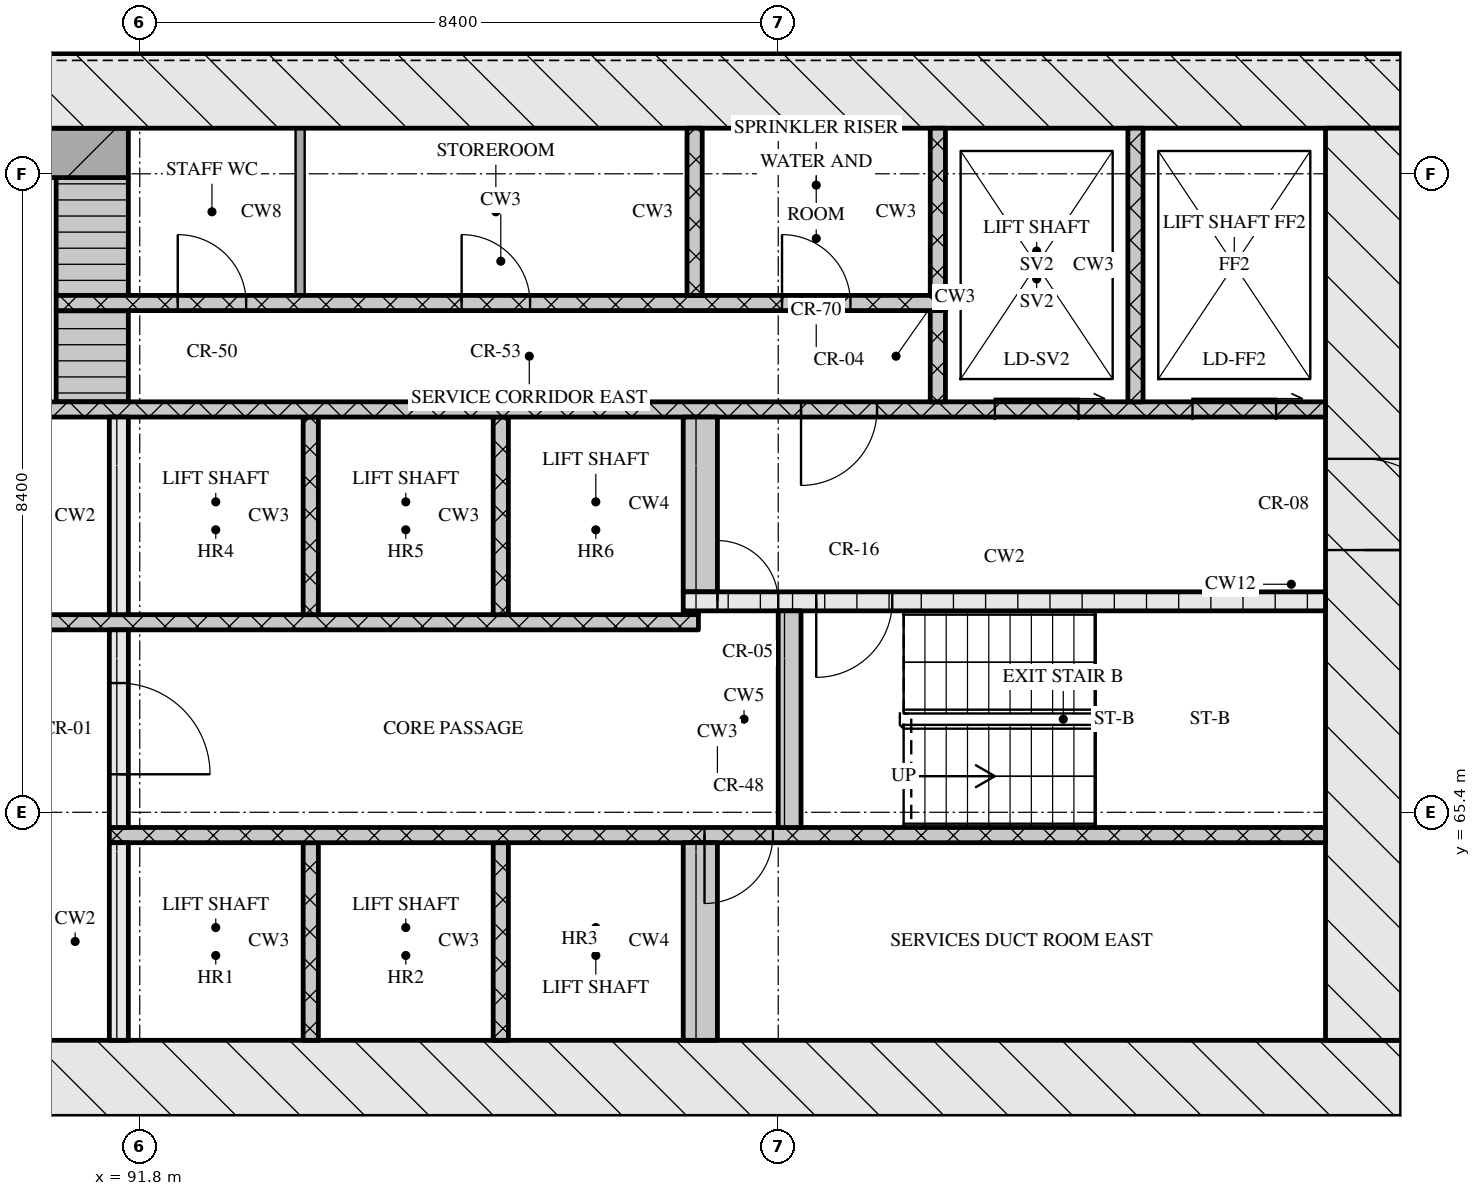
"""IFC4 building model, lengths in metres.
Left out: names, types, materials, properties, quantities, classifications, styles, units other than length and angle.
Written with IfcOpenShell. Run it as: python <this file> out.ifc"""

import sys

from ifc_helpers import new_model, si_unit, direction, frame, frame_2d, origin, place, context, subcontext, project, spatial, rectangle, extrude, element, fill, save


model = new_model("IFC4")
c1 = context("Model", 3, precision=1e-05, world=origin(), true_north=direction((0.0, 1.0)))
c2 = subcontext(c1, "Body", "Model", "MODEL_VIEW")
j1 = project(units=[si_unit("LENGTHUNIT", "METRE"), si_unit("PLANEANGLEUNIT", "RADIAN")], contexts=[c1])
p1 = place(None, origin())
s1 = spatial("IfcSite", under=j1, at=p1, CompositionType="ELEMENT")
p2 = place(p1, origin())
s2 = spatial("IfcBuilding", under=s1, at=p2, CompositionType="ELEMENT")
p3 = place(p2, frame((0.0, 0.0, 113.25)))
s3 = spatial("IfcBuildingStorey", under=s2, at=p3, CompositionType="ELEMENT", Elevation=113.25)
p4 = place(p3, frame((66.8, 61.9, 0.0), z_axis=(0.0, 0.0, 1.0), x_axis=(1.0, 0.0, 0.0)))
e1 = element("IfcWall", 1, at=p4, inside=s3, PredefinedType="SOLIDWALL", context=c2, shape_type="SweptSolid", body=[
    extrude(rectangle(XDim=41.6, YDim=1.0, at=frame_2d((20.8, 0.0))), origin(), (0.0, 0.0, 1.0), 3.32),
])
p5 = place(p4, frame((21.15, 0.0, 0.0)))
e2 = element("IfcOpeningElement", 2, at=p5, cuts=e1, PredefinedType="OPENING", context=c2, shape_type="SweptSolid", body=[
    extrude(rectangle(XDim=1.8, YDim=2.1, at=frame_2d((0.9, 1.05))), frame((0.0, 0.51, 0.0), z_axis=(0.0, -1.0, 0.0), x_axis=(1.0, 0.0, 0.0)), (0.0, 0.0, 1.0), 1.02),
])
p6 = place(p3, frame((66.8, 74.9, 0.0), z_axis=(0.0, 0.0, 1.0), x_axis=(1.0, 0.0, 0.0)))
e3 = element("IfcWall", 3, at=p6, inside=s3, PredefinedType="SOLIDWALL", context=c2, shape_type="SweptSolid", body=[
    extrude(rectangle(XDim=41.6, YDim=1.0, at=frame_2d((20.8, 0.0))), origin(), (0.0, 0.0, 1.0), 3.32),
])
p7 = place(p3, frame((107.9, 62.4, 0.0), z_axis=(0.0, 0.0, 1.0), x_axis=(0.0, 1.0, 0.0)))
e4 = element("IfcWall", 4, at=p7, inside=s3, PredefinedType="SOLIDWALL", context=c2, shape_type="SweptSolid", body=[
    extrude(rectangle(XDim=12.0, YDim=1.0, at=frame_2d((6.0, 0.0))), origin(), (0.0, 0.0, 1.0), 3.32),
])
p8 = place(p7, frame((6.45, 0.0, 0.0)))
e5 = element("IfcOpeningElement", 5, at=p8, cuts=e4, PredefinedType="OPENING", context=c2, shape_type="SweptSolid", body=[
    extrude(rectangle(XDim=1.2, YDim=2.1, at=frame_2d((0.6, 1.05))), frame((0.0, 0.51, 0.0), z_axis=(0.0, -1.0, 0.0), x_axis=(1.0, 0.0, 0.0)), (0.0, 0.0, 1.0), 1.02),
])
p9 = place(p3, frame((91.525, 62.4, 0.0), z_axis=(0.0, 0.0, 1.0), x_axis=(0.0, 1.0, 0.0)))
e6 = element("IfcWall", 6, at=p9, inside=s3, PredefinedType="SOLIDWALL", context=c2, shape_type="SweptSolid", body=[
    extrude(rectangle(XDim=2.6, YDim=0.25, at=frame_2d((1.3, 0.0))), origin(), (0.0, 0.0, 1.0), 3.32),
])
for number, where, z_axis, x_axis in (
    (7, (94.05, 62.4, 0.0), (0.0, 0.0, 1.0), (0.0, 1.0, 0.0)),
    (8, (96.55, 62.4, 0.0), (0.0, 0.0, 1.0), (0.0, 1.0, 0.0)),
):
    element("IfcWall", number, at=place(p3, frame(where, z_axis=z_axis, x_axis=x_axis)), inside=s3, PredefinedType="SOLIDWALL", context=c2, shape_type="SweptSolid", body=[
        extrude(rectangle(XDim=2.6, YDim=0.2, at=frame_2d((1.3, 0.0))), origin(), (0.0, 0.0, 1.0), 3.32),
    ])
p10 = place(p3, frame((99.175, 62.4, 0.0), z_axis=(0.0, 0.0, 1.0), x_axis=(0.0, 1.0, 0.0)))
e9 = element("IfcWall", 9, at=p10, inside=s3, PredefinedType="SOLIDWALL", context=c2, shape_type="SweptSolid", body=[
    extrude(rectangle(XDim=2.6, YDim=0.45, at=frame_2d((1.3, 0.0))), origin(), (0.0, 0.0, 1.0), 3.32),
])
p11 = place(p3, frame((91.4, 65.1, 0.0), z_axis=(0.0, 0.0, 1.0), x_axis=(1.0, 0.0, 0.0)))
e10 = element("IfcWall", 10, at=p11, inside=s3, PredefinedType="SOLIDWALL", context=c2, shape_type="SweptSolid", body=[
    extrude(rectangle(XDim=16.0, YDim=0.2, at=frame_2d((8.0, 0.0))), origin(), (0.0, 0.0, 1.0), 3.32),
])
p12 = place(p11, frame((7.83, 0.0, 0.0)))
e11 = element("IfcOpeningElement", 11, at=p12, cuts=e10, PredefinedType="OPENING", context=c2, shape_type="SweptSolid", body=[
    extrude(rectangle(XDim=0.9, YDim=2.1, at=frame_2d((0.45, 1.05))), frame((0.0, 0.11, 0.0), z_axis=(0.0, -1.0, 0.0), x_axis=(1.0, 0.0, 0.0)), (0.0, 0.0, 1.0), 0.22),
])
p13 = place(p3, frame((91.525, 65.2, 0.0), z_axis=(0.0, 0.0, 1.0), x_axis=(0.0, 1.0, 0.0)))
e12 = element("IfcWall", 12, at=p13, inside=s3, PredefinedType="SOLIDWALL", context=c2, shape_type="SweptSolid", body=[
    extrude(rectangle(XDim=2.6, YDim=0.25, at=frame_2d((1.3, 0.0))), origin(), (0.0, 0.0, 1.0), 3.32),
])
p14 = place(p13, frame((0.7, 0.0, 0.0)))
e13 = element("IfcOpeningElement", 13, at=p14, cuts=e12, PredefinedType="OPENING", context=c2, shape_type="SweptSolid", body=[
    extrude(rectangle(XDim=1.2, YDim=2.1, at=frame_2d((0.6, 1.05))), frame((0.0, 0.135, 0.0), z_axis=(0.0, -1.0, 0.0), x_axis=(1.0, 0.0, 0.0)), (0.0, 0.0, 1.0), 0.27),
])
p15 = place(p3, frame((100.35, 65.2, 0.0), z_axis=(0.0, 0.0, 1.0), x_axis=(0.0, 1.0, 0.0)))
e14 = element("IfcWall", 14, at=p15, inside=s3, PredefinedType="SOLIDWALL", context=c2, shape_type="SweptSolid", body=[
    extrude(rectangle(XDim=2.85, YDim=0.3, at=frame_2d((1.425, 0.0))), origin(), (0.0, 0.0, 1.0), 3.32),
])
p16 = place(p3, frame((76.05, 67.9, 0.0), z_axis=(0.0, 0.0, 1.0), x_axis=(1.0, 0.0, 0.0)))
e15 = element("IfcWall", 15, at=p16, inside=s3, PredefinedType="SOLIDWALL", context=c2, shape_type="SweptSolid", body=[
    extrude(rectangle(XDim=23.1, YDim=0.2, at=frame_2d((11.55, 0.0))), origin(), (0.0, 0.0, 1.0), 3.32),
])
p17 = place(p16, frame((0.6, 0.0, 0.0)))
e16 = element("IfcOpeningElement", 16, at=p17, cuts=e15, PredefinedType="OPENING", context=c2, shape_type="SweptSolid", body=[
    extrude(rectangle(XDim=1.1, YDim=2.1, at=frame_2d((0.55, 1.05))), frame((0.0, 0.11, 0.0), z_axis=(0.0, -1.0, 0.0), x_axis=(1.0, 0.0, 0.0)), (0.0, 0.0, 1.0), 0.22),
])
p18 = place(p16, frame((3.1, 0.0, 0.0)))
e17 = element("IfcOpeningElement", 17, at=p18, cuts=e15, PredefinedType="OPENING", context=c2, shape_type="SweptSolid", body=[
    extrude(rectangle(XDim=1.1, YDim=2.1, at=frame_2d((0.55, 1.05))), frame((0.0, 0.11, 0.0), z_axis=(0.0, -1.0, 0.0), x_axis=(1.0, 0.0, 0.0)), (0.0, 0.0, 1.0), 0.22),
])
p19 = place(p16, frame((5.6, 0.0, 0.0)))
e18 = element("IfcOpeningElement", 18, at=p19, cuts=e15, PredefinedType="OPENING", context=c2, shape_type="SweptSolid", body=[
    extrude(rectangle(XDim=1.1, YDim=2.1, at=frame_2d((0.55, 1.05))), frame((0.0, 0.11, 0.0), z_axis=(0.0, -1.0, 0.0), x_axis=(1.0, 0.0, 0.0)), (0.0, 0.0, 1.0), 0.22),
])
p20 = place(p16, frame((9.7, 0.0, 0.0)))
e19 = element("IfcOpeningElement", 19, at=p20, cuts=e15, PredefinedType="OPENING", context=c2, shape_type="SweptSolid", body=[
    extrude(rectangle(XDim=0.9, YDim=2.1, at=frame_2d((0.45, 1.05))), frame((0.0, 0.11, 0.0), z_axis=(0.0, -1.0, 0.0), x_axis=(1.0, 0.0, 0.0)), (0.0, 0.0, 1.0), 0.22),
])
p21 = place(p16, frame((13.55, 0.0, 0.0)))
e20 = element("IfcOpeningElement", 20, at=p21, cuts=e15, PredefinedType="OPENING", context=c2, shape_type="SweptSolid", body=[
    extrude(rectangle(XDim=1.0, YDim=2.1, at=frame_2d((0.5, 1.05))), frame((0.0, 0.11, 0.0), z_axis=(0.0, -1.0, 0.0), x_axis=(1.0, 0.0, 0.0)), (0.0, 0.0, 1.0), 0.22),
])
p22 = place(p3, frame((91.525, 68.0, 0.0), z_axis=(0.0, 0.0, 1.0), x_axis=(0.0, 1.0, 0.0)))
e21 = element("IfcWall", 21, at=p22, inside=s3, PredefinedType="SOLIDWALL", context=c2, shape_type="SweptSolid", body=[
    extrude(rectangle(XDim=2.6, YDim=0.25, at=frame_2d((1.3, 0.0))), origin(), (0.0, 0.0, 1.0), 3.32),
])
for number, where, z_axis, x_axis in (
    (22, (94.05, 68.0, 0.0), (0.0, 0.0, 1.0), (0.0, 1.0, 0.0)),
    (23, (96.55, 68.0, 0.0), (0.0, 0.0, 1.0), (0.0, 1.0, 0.0)),
):
    element("IfcWall", number, at=place(p3, frame(where, z_axis=z_axis, x_axis=x_axis)), inside=s3, PredefinedType="SOLIDWALL", context=c2, shape_type="SweptSolid", body=[
        extrude(rectangle(XDim=2.6, YDim=0.2, at=frame_2d((1.3, 0.0))), origin(), (0.0, 0.0, 1.0), 3.32),
    ])
p23 = place(p3, frame((98.95, 68.025, 0.0), z_axis=(0.0, 0.0, 1.0), x_axis=(1.0, 0.0, 0.0)))
e24 = element("IfcWall", 24, at=p23, inside=s3, PredefinedType="SOLIDWALL", context=c2, shape_type="SweptSolid", body=[
    extrude(rectangle(XDim=0.2, YDim=0.05, at=frame_2d((0.1, 0.0))), origin(), (0.0, 0.0, 1.0), 3.32),
])
p24 = place(p3, frame((98.95, 68.175, 0.0), z_axis=(0.0, 0.0, 1.0), x_axis=(1.0, 0.0, 0.0)))
e25 = element("IfcWall", 25, at=p24, inside=s3, PredefinedType="SOLIDWALL", context=c2, shape_type="SweptSolid", body=[
    extrude(rectangle(XDim=8.45, YDim=0.25, at=frame_2d((4.225, 0.0))), origin(), (0.0, 0.0, 1.0), 3.32),
])
p25 = place(p24, frame((0.45, 0.0, 0.0)))
e26 = element("IfcOpeningElement", 26, at=p25, cuts=e25, PredefinedType="OPENING", context=c2, shape_type="SweptSolid", body=[
    extrude(rectangle(XDim=0.8, YDim=2.1, at=frame_2d((0.4, 1.05))), frame((0.0, 0.135, 0.0), z_axis=(0.0, -1.0, 0.0), x_axis=(1.0, 0.0, 0.0)), (0.0, 0.0, 1.0), 0.27),
])
p26 = place(p24, frame((1.75, 0.0, 0.0)))
e27 = element("IfcOpeningElement", 27, at=p26, cuts=e25, PredefinedType="OPENING", context=c2, shape_type="SweptSolid", body=[
    extrude(rectangle(XDim=1.0, YDim=2.1, at=frame_2d((0.5, 1.05))), frame((0.0, 0.135, 0.0), z_axis=(0.0, -1.0, 0.0), x_axis=(1.0, 0.0, 0.0)), (0.0, 0.0, 1.0), 0.27),
])
p27 = place(p3, frame((99.175, 68.3, 0.0), z_axis=(0.0, 0.0, 1.0), x_axis=(0.0, 1.0, 0.0)))
e28 = element("IfcWall", 28, at=p27, inside=s3, PredefinedType="SOLIDWALL", context=c2, shape_type="SweptSolid", body=[
    extrude(rectangle(XDim=2.3, YDim=0.45, at=frame_2d((1.15, 0.0))), origin(), (0.0, 0.0, 1.0), 3.32),
])
p28 = place(p3, frame((67.8, 70.7, 0.0), z_axis=(0.0, 0.0, 1.0), x_axis=(1.0, 0.0, 0.0)))
e29 = element("IfcWall", 29, at=p28, inside=s3, PredefinedType="SOLIDWALL", context=c2, shape_type="SweptSolid", body=[
    extrude(rectangle(XDim=39.6, YDim=0.2, at=frame_2d((19.8, 0.0))), origin(), (0.0, 0.0, 1.0), 3.32),
])
p29 = place(p28, frame((0.65, 0.0, 0.0)))
e30 = element("IfcOpeningElement", 30, at=p29, cuts=e29, PredefinedType="OPENING", context=c2, shape_type="SweptSolid", body=[
    extrude(rectangle(XDim=1.1, YDim=2.1, at=frame_2d((0.55, 1.05))), frame((0.0, 0.11, 0.0), z_axis=(0.0, -1.0, 0.0), x_axis=(1.0, 0.0, 0.0)), (0.0, 0.0, 1.0), 0.22),
])
p30 = place(p28, frame((3.25, 0.0, 0.0)))
e31 = element("IfcOpeningElement", 31, at=p30, cuts=e29, PredefinedType="OPENING", context=c2, shape_type="SweptSolid", body=[
    extrude(rectangle(XDim=1.1, YDim=2.1, at=frame_2d((0.55, 1.05))), frame((0.0, 0.11, 0.0), z_axis=(0.0, -1.0, 0.0), x_axis=(1.0, 0.0, 0.0)), (0.0, 0.0, 1.0), 0.22),
])
p31 = place(p28, frame((5.9, 0.0, 0.0)))
e32 = element("IfcOpeningElement", 32, at=p31, cuts=e29, PredefinedType="OPENING", context=c2, shape_type="SweptSolid", body=[
    extrude(rectangle(XDim=1.0, YDim=2.1, at=frame_2d((0.5, 1.05))), frame((0.0, 0.11, 0.0), z_axis=(0.0, -1.0, 0.0), x_axis=(1.0, 0.0, 0.0)), (0.0, 0.0, 1.0), 0.22),
])
p32 = place(p28, frame((21.7, 0.0, 0.0)))
e33 = element("IfcOpeningElement", 33, at=p32, cuts=e29, PredefinedType="OPENING", context=c2, shape_type="SweptSolid", body=[
    extrude(rectangle(XDim=1.0, YDim=2.1, at=frame_2d((0.5, 1.05))), frame((0.0, 0.11, 0.0), z_axis=(0.0, -1.0, 0.0), x_axis=(1.0, 0.0, 0.0)), (0.0, 0.0, 1.0), 0.22),
])
p33 = place(p28, frame((32.7, 0.0, 0.0)))
e34 = element("IfcOpeningElement", 34, at=p33, cuts=e29, PredefinedType="OPENING", context=c2, shape_type="SweptSolid", body=[
    extrude(rectangle(XDim=1.0, YDim=2.1, at=frame_2d((0.5, 1.05))), frame((0.0, 0.11, 0.0), z_axis=(0.0, -1.0, 0.0), x_axis=(1.0, 0.0, 0.0)), (0.0, 0.0, 1.0), 0.22),
])
p34 = place(p28, frame((35.25, 0.0, 0.0)))
e35 = element("IfcOpeningElement", 35, at=p34, cuts=e29, PredefinedType="OPENING", context=c2, shape_type="SweptSolid", body=[
    extrude(rectangle(XDim=1.1, YDim=2.1, at=frame_2d((0.55, 1.05))), frame((0.0, 0.11, 0.0), z_axis=(0.0, -1.0, 0.0), x_axis=(1.0, 0.0, 0.0)), (0.0, 0.0, 1.0), 0.22),
])
p35 = place(p28, frame((37.85, 0.0, 0.0)))
e36 = element("IfcOpeningElement", 36, at=p35, cuts=e29, PredefinedType="OPENING", context=c2, shape_type="SweptSolid", body=[
    extrude(rectangle(XDim=1.1, YDim=2.1, at=frame_2d((0.55, 1.05))), frame((0.0, 0.11, 0.0), z_axis=(0.0, -1.0, 0.0), x_axis=(1.0, 0.0, 0.0)), (0.0, 0.0, 1.0), 0.22),
])
p36 = place(p3, frame((91.175, 70.8, 0.0), z_axis=(0.0, 0.0, 1.0), x_axis=(0.0, 1.0, 0.0)))
e37 = element("IfcWall", 37, at=p36, inside=s3, PredefinedType="SOLIDWALL", context=c2, shape_type="SweptSolid", body=[
    extrude(rectangle(XDim=1.2, YDim=0.95, at=frame_2d((0.6, 0.0))), origin(), (0.0, 0.0, 1.0), 3.32),
])
p37 = place(p3, frame((102.3, 70.8, 0.0), z_axis=(0.0, 0.0, 1.0), x_axis=(0.0, 1.0, 0.0)))
e38 = element("IfcWall", 38, at=p37, inside=s3, PredefinedType="SOLIDWALL", context=c2, shape_type="SweptSolid", body=[
    extrude(rectangle(XDim=1.2, YDim=0.2, at=frame_2d((0.6, 0.0))), origin(), (0.0, 0.0, 1.0), 3.32),
])
p38 = place(p3, frame((104.9, 70.8, 0.0), z_axis=(0.0, 0.0, 1.0), x_axis=(0.0, 1.0, 0.0)))
e39 = element("IfcWall", 39, at=p38, inside=s3, PredefinedType="SOLIDWALL", context=c2, shape_type="SweptSolid", body=[
    extrude(rectangle(XDim=3.6, YDim=0.2, at=frame_2d((1.8, 0.0))), origin(), (0.0, 0.0, 1.0), 3.32),
])
p39 = place(p3, frame((90.7, 72.1, 0.0), z_axis=(0.0, 0.0, 1.0), x_axis=(1.0, 0.0, 0.0)))
e40 = element("IfcWall", 40, at=p39, inside=s3, PredefinedType="SOLIDWALL", context=c2, shape_type="SweptSolid", body=[
    extrude(rectangle(XDim=11.7, YDim=0.2, at=frame_2d((5.85, 0.0))), origin(), (0.0, 0.0, 1.0), 3.32),
])
p40 = place(p39, frame((1.6, 0.0, 0.0)))
e41 = element("IfcOpeningElement", 41, at=p40, cuts=e40, PredefinedType="OPENING", context=c2, shape_type="SweptSolid", body=[
    extrude(rectangle(XDim=0.9, YDim=2.1, at=frame_2d((0.45, 1.05))), frame((0.0, 0.11, 0.0), z_axis=(0.0, -1.0, 0.0), x_axis=(1.0, 0.0, 0.0)), (0.0, 0.0, 1.0), 0.22),
])
p41 = place(p39, frame((5.335, 0.0, 0.0)))
e42 = element("IfcOpeningElement", 42, at=p41, cuts=e40, PredefinedType="OPENING", context=c2, shape_type="SweptSolid", body=[
    extrude(rectangle(XDim=0.9, YDim=2.1, at=frame_2d((0.45, 1.05))), frame((0.0, 0.11, 0.0), z_axis=(0.0, -1.0, 0.0), x_axis=(1.0, 0.0, 0.0)), (0.0, 0.0, 1.0), 0.22),
])
p42 = place(p39, frame((9.55, 0.0, 0.0)))
e43 = element("IfcOpeningElement", 43, at=p42, cuts=e40, PredefinedType="OPENING", context=c2, shape_type="SweptSolid", body=[
    extrude(rectangle(XDim=0.9, YDim=2.1, at=frame_2d((0.45, 1.05))), frame((0.0, 0.11, 0.0), z_axis=(0.0, -1.0, 0.0), x_axis=(1.0, 0.0, 0.0)), (0.0, 0.0, 1.0), 0.22),
])
p43 = place(p3, frame((91.175, 72.2, 0.0), z_axis=(0.0, 0.0, 1.0), x_axis=(0.0, 1.0, 0.0)))
e44 = element("IfcWall", 44, at=p43, inside=s3, PredefinedType="SOLIDWALL", context=c2, shape_type="SweptSolid", body=[
    extrude(rectangle(XDim=1.55, YDim=0.95, at=frame_2d((0.775, 0.0))), origin(), (0.0, 0.0, 1.0), 3.32),
])
p44 = place(p3, frame((93.91, 72.2, 0.0), z_axis=(0.0, 0.0, 1.0), x_axis=(0.0, 1.0, 0.0)))
e45 = element("IfcWall", 45, at=p44, inside=s3, PredefinedType="PARTITIONING", context=c2, shape_type="SweptSolid", body=[
    extrude(rectangle(XDim=2.2, YDim=0.12, at=frame_2d((1.1, 0.0))), origin(), (0.0, 0.0, 1.0), 3.32),
])
for number, where, z_axis, x_axis in (
    (46, (99.1, 72.2, 0.0), (0.0, 0.0, 1.0), (0.0, 1.0, 0.0)),
    (47, (102.3, 72.2, 0.0), (0.0, 0.0, 1.0), (0.0, 1.0, 0.0)),
):
    element("IfcWall", number, at=place(p3, frame(where, z_axis=z_axis, x_axis=x_axis)), inside=s3, PredefinedType="SOLIDWALL", context=c2, shape_type="SweptSolid", body=[
        extrude(rectangle(XDim=2.2, YDim=0.2, at=frame_2d((1.1, 0.0))), origin(), (0.0, 0.0, 1.0), 3.32),
    ])
p45 = place(p3, frame((83.55, 74.075, 0.0), z_axis=(0.0, 0.0, 1.0), x_axis=(1.0, 0.0, 0.0)))
e48 = element("IfcWall", 48, at=p45, inside=s3, PredefinedType="SOLIDWALL", context=c2, shape_type="SweptSolid", body=[
    extrude(rectangle(XDim=8.1, YDim=0.65, at=frame_2d((4.05, 0.0))), origin(), (0.0, 0.0, 1.0), 3.32),
])
p46 = place(p12, origin())
e49 = element("IfcDoor", 49, at=p46, inside=s3, OperationType="SINGLE_SWING_RIGHT", PredefinedType="DOOR", context=c2, shape_type="SweptSolid", body=[
    extrude(rectangle(XDim=0.9, YDim=2.1, at=frame_2d((0.45, 1.05))), frame((0.0, 0.025, 0.0), z_axis=(0.0, -1.0, 0.0), x_axis=(1.0, 0.0, 0.0)), (0.0, 0.0, 1.0), 0.05),
])
fill(e11, e49)
p47 = place(p14, origin())
e50 = element("IfcDoor", 50, at=p47, inside=s3, OperationType="SINGLE_SWING_RIGHT", PredefinedType="DOOR", context=c2, shape_type="SweptSolid", body=[
    extrude(rectangle(XDim=1.2, YDim=2.1, at=frame_2d((0.6, 1.05))), frame((0.0, 0.025, 0.0), z_axis=(0.0, -1.0, 0.0), x_axis=(1.0, 0.0, 0.0)), (0.0, 0.0, 1.0), 0.05),
])
fill(e13, e50)
p48 = place(p25, origin())
e51 = element("IfcDoor", 51, at=p48, inside=s3, OperationType="SINGLE_SWING_LEFT", PredefinedType="DOOR", context=c2, shape_type="SweptSolid", body=[
    extrude(rectangle(XDim=0.8, YDim=2.1, at=frame_2d((0.4, 1.05))), frame((0.0, 0.025, 0.0), z_axis=(0.0, -1.0, 0.0), x_axis=(1.0, 0.0, 0.0)), (0.0, 0.0, 1.0), 0.05),
])
fill(e26, e51)
p49 = place(p26, origin())
e52 = element("IfcDoor", 52, at=p49, inside=s3, OperationType="SINGLE_SWING_RIGHT", PredefinedType="DOOR", context=c2, shape_type="SweptSolid", body=[
    extrude(rectangle(XDim=1.0, YDim=2.1, at=frame_2d((0.5, 1.05))), frame((0.0, 0.025, 0.0), z_axis=(0.0, -1.0, 0.0), x_axis=(1.0, 0.0, 0.0)), (0.0, 0.0, 1.0), 0.05),
])
fill(e27, e52)
p50 = place(p8, origin())
e53 = element("IfcDoor", 53, at=p50, inside=s3, OperationType="SINGLE_SWING_RIGHT", PredefinedType="DOOR", context=c2, shape_type="SweptSolid", body=[
    extrude(rectangle(XDim=1.2, YDim=2.1, at=frame_2d((0.6, 1.05))), frame((0.0, 0.025, 0.0), z_axis=(0.0, -1.0, 0.0), x_axis=(1.0, 0.0, 0.0)), (0.0, 0.0, 1.0), 0.05),
])
fill(e5, e53)
p51 = place(p33, origin())
e54 = element("IfcDoor", 54, at=p51, inside=s3, OperationType="SINGLE_SWING_RIGHT", PredefinedType="DOOR", context=c2, shape_type="SweptSolid", body=[
    extrude(rectangle(XDim=1.0, YDim=2.1, at=frame_2d((0.5, 1.05))), frame((0.0, 0.025, 0.0), z_axis=(0.0, -1.0, 0.0), x_axis=(1.0, 0.0, 0.0)), (0.0, 0.0, 1.0), 0.05),
])
fill(e34, e54)
p52 = place(p34, origin())
e55 = element("IfcDoor", 55, at=p52, inside=s3, OperationType="SLIDING_TO_RIGHT", PredefinedType="DOOR", context=c2, shape_type="SweptSolid", body=[
    extrude(rectangle(XDim=1.1, YDim=2.1, at=frame_2d((0.55, 1.05))), frame((0.0, 0.025, 0.0), z_axis=(0.0, -1.0, 0.0), x_axis=(1.0, 0.0, 0.0)), (0.0, 0.0, 1.0), 0.05),
])
fill(e35, e55)
p53 = place(p35, origin())
e56 = element("IfcDoor", 56, at=p53, inside=s3, OperationType="SLIDING_TO_RIGHT", PredefinedType="DOOR", context=c2, shape_type="SweptSolid", body=[
    extrude(rectangle(XDim=1.1, YDim=2.1, at=frame_2d((0.55, 1.05))), frame((0.0, 0.025, 0.0), z_axis=(0.0, -1.0, 0.0), x_axis=(1.0, 0.0, 0.0)), (0.0, 0.0, 1.0), 0.05),
])
fill(e36, e56)
p54 = place(p40, origin())
e57 = element("IfcDoor", 57, at=p54, inside=s3, OperationType="SINGLE_SWING_LEFT", PredefinedType="DOOR", context=c2, shape_type="SweptSolid", body=[
    extrude(rectangle(XDim=0.9, YDim=2.1, at=frame_2d((0.45, 1.05))), frame((0.0, 0.025, 0.0), z_axis=(0.0, -1.0, 0.0), x_axis=(1.0, 0.0, 0.0)), (0.0, 0.0, 1.0), 0.05),
])
fill(e41, e57)
p55 = place(p41, origin())
e58 = element("IfcDoor", 58, at=p55, inside=s3, OperationType="SINGLE_SWING_LEFT", PredefinedType="DOOR", context=c2, shape_type="SweptSolid", body=[
    extrude(rectangle(XDim=0.9, YDim=2.1, at=frame_2d((0.45, 1.05))), frame((0.0, 0.025, 0.0), z_axis=(0.0, -1.0, 0.0), x_axis=(1.0, 0.0, 0.0)), (0.0, 0.0, 1.0), 0.05),
])
fill(e42, e58)
p56 = place(p42, origin())
e59 = element("IfcDoor", 59, at=p56, inside=s3, OperationType="SINGLE_SWING_LEFT", PredefinedType="DOOR", context=c2, shape_type="SweptSolid", body=[
    extrude(rectangle(XDim=0.9, YDim=2.1, at=frame_2d((0.45, 1.05))), frame((0.0, 0.025, 0.0), z_axis=(0.0, -1.0, 0.0), x_axis=(1.0, 0.0, 0.0)), (0.0, 0.0, 1.0), 0.05),
])
fill(e43, e59)
save(model, sys.argv[1])
